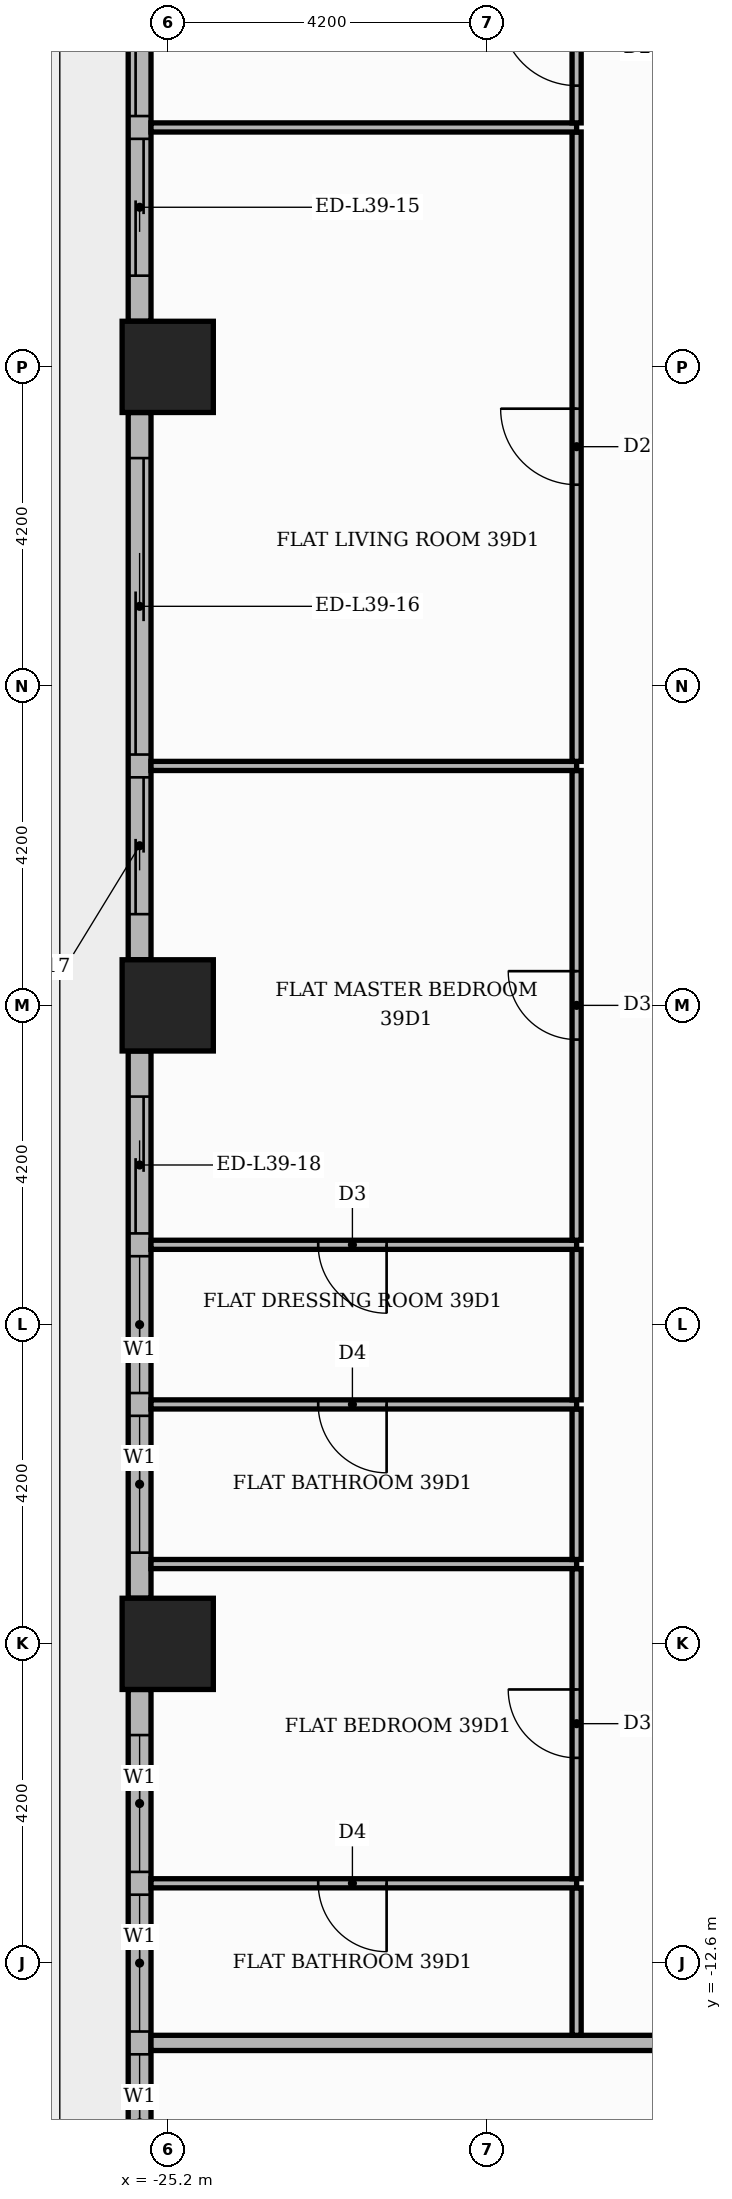
"""IFC4 building model, lengths in metres.
Left out: names, types, materials, properties, quantities, classifications, styles, units other than length and angle.
Written with IfcOpenShell. Run it as: python <this file> out.ifc"""

import sys

from ifc_helpers import new_model, si_unit, direction, frame, frame_2d, origin, origin_2d, place, context, subcontext, project, spatial, rectangle, extrude, element, fill, save


model = new_model("IFC4")
c1 = context("Model", 3, precision=1e-05, world=origin(), true_north=direction((0.0, 1.0)))
c2 = subcontext(c1, "Body", "Model", "MODEL_VIEW")
j1 = project(units=[si_unit("LENGTHUNIT", "METRE"), si_unit("PLANEANGLEUNIT", "RADIAN")], contexts=[c1])
p1 = place(None, origin())
s1 = spatial("IfcSite", under=j1, at=p1, CompositionType="ELEMENT")
p2 = place(p1, origin())
s2 = spatial("IfcBuilding", under=s1, at=p2, CompositionType="ELEMENT")
p3 = place(p2, frame((0.0, 0.0, 165.0)))
s3 = spatial("IfcBuildingStorey", under=s2, at=p3, CompositionType="ELEMENT", Elevation=165.0)
for number, where, z_axis, x_axis in (
    (1, (-25.2, 0.0, 0.0), (0.0, 0.0, 1.0), (1.0, 0.0, 0.0)),
    (2, (-25.2, -8.4, 0.0), (0.0, 0.0, 1.0), (1.0, 0.0, 0.0)),
    (3, (-25.2, 8.4, 0.0), (0.0, 0.0, 1.0), (1.0, 0.0, 0.0)),
):
    element("IfcColumn", number, at=place(p3, frame(where, z_axis=z_axis, x_axis=x_axis)), inside=s3, PredefinedType="COLUMN", context=c2, shape_type="SweptSolid", body=[
        extrude(rectangle(XDim=1.2, YDim=1.2, at=origin_2d()), origin(), (0.0, 0.0, 1.0), 3.9),
    ])
p4 = place(p3, frame((-25.57, 16.2, 0.0), z_axis=(0.0, 0.0, 1.0), x_axis=(0.0, -1.0, 0.0)))
e4 = element("IfcWall", 4, at=p4, inside=s3, PredefinedType="STANDARD", context=c2, shape_type="SweptSolid", body=[
    extrude(rectangle(XDim=7.2, YDim=0.3, at=frame_2d((3.6, 0.0))), origin(), (0.0, 0.0, 1.0), 3.48),
])
p5 = place(p4, frame((0.6, 0.0, 0.0)))
e5 = element("IfcOpeningElement", 5, at=p5, cuts=e4, PredefinedType="OPENING", context=c2, shape_type="SweptSolid", body=[
    extrude(rectangle(XDim=3.9, YDim=2.4, at=frame_2d((1.95, 1.2))), frame((0.0, 0.16, 0.0), z_axis=(0.0, -1.0, 0.0), x_axis=(1.0, 0.0, 0.0)), (0.0, 0.0, 1.0), 0.32),
])
p6 = place(p4, frame((4.8, 0.0, 0.0)))
e6 = element("IfcOpeningElement", 6, at=p6, cuts=e4, PredefinedType="OPENING", context=c2, shape_type="SweptSolid", body=[
    extrude(rectangle(XDim=1.8, YDim=2.4, at=frame_2d((0.9, 1.2))), frame((0.0, 0.16, 0.0), z_axis=(0.0, -1.0, 0.0), x_axis=(1.0, 0.0, 0.0)), (0.0, 0.0, 1.0), 0.32),
])
p7 = place(p3, frame((-25.57, 7.8, 0.0), z_axis=(0.0, 0.0, 1.0), x_axis=(0.0, -1.0, 0.0)))
e7 = element("IfcWall", 7, at=p7, inside=s3, PredefinedType="STANDARD", context=c2, shape_type="SweptSolid", body=[
    extrude(rectangle(XDim=7.2, YDim=0.3, at=frame_2d((3.6, 0.0))), origin(), (0.0, 0.0, 1.0), 3.48),
])
p8 = place(p7, frame((0.6, 0.0, 0.0)))
e8 = element("IfcOpeningElement", 8, at=p8, cuts=e7, PredefinedType="OPENING", context=c2, shape_type="SweptSolid", body=[
    extrude(rectangle(XDim=3.9, YDim=2.4, at=frame_2d((1.95, 1.2))), frame((0.0, 0.16, 0.0), z_axis=(0.0, -1.0, 0.0), x_axis=(1.0, 0.0, 0.0)), (0.0, 0.0, 1.0), 0.32),
])
p9 = place(p7, frame((4.8, 0.0, 0.0)))
e9 = element("IfcOpeningElement", 9, at=p9, cuts=e7, PredefinedType="OPENING", context=c2, shape_type="SweptSolid", body=[
    extrude(rectangle(XDim=1.8, YDim=2.4, at=frame_2d((0.9, 1.2))), frame((0.0, 0.16, 0.0), z_axis=(0.0, -1.0, 0.0), x_axis=(1.0, 0.0, 0.0)), (0.0, 0.0, 1.0), 0.32),
])
p10 = place(p3, frame((-25.57, -0.6, 0.0), z_axis=(0.0, 0.0, 1.0), x_axis=(0.0, -1.0, 0.0)))
e10 = element("IfcWall", 10, at=p10, inside=s3, PredefinedType="STANDARD", context=c2, shape_type="SweptSolid", body=[
    extrude(rectangle(XDim=7.2, YDim=0.3, at=frame_2d((3.6, 0.0))), origin(), (0.0, 0.0, 1.0), 3.48),
])
p11 = place(p10, frame((0.6, 0.0, 0.0)))
e11 = element("IfcOpeningElement", 11, at=p11, cuts=e10, PredefinedType="OPENING", context=c2, shape_type="SweptSolid", body=[
    extrude(rectangle(XDim=1.8, YDim=2.4, at=frame_2d((0.9, 1.2))), frame((0.0, 0.16, 0.0), z_axis=(0.0, -1.0, 0.0), x_axis=(1.0, 0.0, 0.0)), (0.0, 0.0, 1.0), 0.32),
])
p12 = place(p10, frame((2.7, 0.0, 0.9)))
e12 = element("IfcOpeningElement", 12, at=p12, cuts=e10, PredefinedType="OPENING", context=c2, shape_type="SweptSolid", body=[
    extrude(rectangle(XDim=1.8, YDim=2.1, at=frame_2d((0.9, 1.05))), frame((0.0, 0.16, 0.0), z_axis=(0.0, -1.0, 0.0), x_axis=(1.0, 0.0, 0.0)), (0.0, 0.0, 1.0), 0.32),
])
p13 = place(p10, frame((4.8, 0.0, 0.9)))
e13 = element("IfcOpeningElement", 13, at=p13, cuts=e10, PredefinedType="OPENING", context=c2, shape_type="SweptSolid", body=[
    extrude(rectangle(XDim=1.8, YDim=2.1, at=frame_2d((0.9, 1.05))), frame((0.0, 0.16, 0.0), z_axis=(0.0, -1.0, 0.0), x_axis=(1.0, 0.0, 0.0)), (0.0, 0.0, 1.0), 0.32),
])
p14 = place(p3, frame((-25.57, -9.0, 0.0), z_axis=(0.0, 0.0, 1.0), x_axis=(0.0, -1.0, 0.0)))
e14 = element("IfcWall", 14, at=p14, inside=s3, PredefinedType="STANDARD", context=c2, shape_type="SweptSolid", body=[
    extrude(rectangle(XDim=7.2, YDim=0.3, at=frame_2d((3.6, 0.0))), origin(), (0.0, 0.0, 1.0), 3.48),
])
p15 = place(p14, frame((0.6, 0.0, 0.9)))
e15 = element("IfcOpeningElement", 15, at=p15, cuts=e14, PredefinedType="OPENING", context=c2, shape_type="SweptSolid", body=[
    extrude(rectangle(XDim=1.8, YDim=2.1, at=frame_2d((0.9, 1.05))), frame((0.0, 0.16, 0.0), z_axis=(0.0, -1.0, 0.0), x_axis=(1.0, 0.0, 0.0)), (0.0, 0.0, 1.0), 0.32),
])
p16 = place(p14, frame((2.7, 0.0, 0.9)))
e16 = element("IfcOpeningElement", 16, at=p16, cuts=e14, PredefinedType="OPENING", context=c2, shape_type="SweptSolid", body=[
    extrude(rectangle(XDim=1.8, YDim=2.1, at=frame_2d((0.9, 1.05))), frame((0.0, 0.16, 0.0), z_axis=(0.0, -1.0, 0.0), x_axis=(1.0, 0.0, 0.0)), (0.0, 0.0, 1.0), 0.32),
])
p17 = place(p14, frame((4.8, 0.0, 0.9)))
e17 = element("IfcOpeningElement", 17, at=p17, cuts=e14, PredefinedType="OPENING", context=c2, shape_type="SweptSolid", body=[
    extrude(rectangle(XDim=1.8, YDim=2.1, at=frame_2d((0.9, 1.05))), frame((0.0, 0.16, 0.0), z_axis=(0.0, -1.0, 0.0), x_axis=(1.0, 0.0, 0.0)), (0.0, 0.0, 1.0), 0.32),
])
p18 = place(p3, frame((-25.42, -13.65, 0.0), z_axis=(0.0, 0.0, 1.0), x_axis=(1.0, 0.0, 0.0)))
e18 = element("IfcWall", 18, at=p18, inside=s3, PredefinedType="PARTITIONING", context=c2, shape_type="SweptSolid", body=[
    extrude(rectangle(XDim=39.07, YDim=0.2, at=frame_2d((19.535, 0.0))), origin(), (0.0, 0.0, 1.0), 3.48),
])
p19 = place(p18, frame((13.32, 0.0, 0.0)))
e19 = element("IfcOpeningElement", 19, at=p19, cuts=e18, PredefinedType="OPENING", context=c2, shape_type="SweptSolid", body=[
    extrude(rectangle(XDim=1.1, YDim=2.4, at=frame_2d((0.55, 1.2))), frame((0.0, 0.11, 0.0), z_axis=(0.0, -1.0, 0.0), x_axis=(1.0, 0.0, 0.0)), (0.0, 0.0, 1.0), 0.22),
])
p20 = place(p18, frame((21.72, 0.0, 0.0)))
e20 = element("IfcOpeningElement", 20, at=p20, cuts=e18, PredefinedType="OPENING", context=c2, shape_type="SweptSolid", body=[
    extrude(rectangle(XDim=1.1, YDim=2.4, at=frame_2d((0.55, 1.2))), frame((0.0, 0.11, 0.0), z_axis=(0.0, -1.0, 0.0), x_axis=(1.0, 0.0, 0.0)), (0.0, 0.0, 1.0), 0.22),
])
p21 = place(p3, frame((-19.82, -13.55, 0.0), z_axis=(0.0, 0.0, 1.0), x_axis=(0.0, 1.0, 0.0)))
e21 = element("IfcWall", 21, at=p21, inside=s3, PredefinedType="PARTITIONING", context=c2, shape_type="SweptSolid", body=[
    extrude(rectangle(XDim=1.94, YDim=0.12, at=frame_2d((0.97, 0.0))), origin(), (0.0, 0.0, 1.0), 3.48),
])
p22 = place(p3, frame((-25.42, -11.55, 0.0), z_axis=(0.0, 0.0, 1.0), x_axis=(1.0, 0.0, 0.0)))
e22 = element("IfcWall", 22, at=p22, inside=s3, PredefinedType="PARTITIONING", context=c2, shape_type="SweptSolid", body=[
    extrude(rectangle(XDim=5.6, YDim=0.12, at=frame_2d((2.8, 0.0))), origin(), (0.0, 0.0, 1.0), 3.48),
])
p23 = place(p22, frame((2.2, 0.0, 0.0)))
e23 = element("IfcOpeningElement", 23, at=p23, cuts=e22, PredefinedType="OPENING", context=c2, shape_type="SweptSolid", body=[
    extrude(rectangle(XDim=0.9, YDim=2.1, at=frame_2d((0.45, 1.05))), frame((0.0, 0.07, 0.0), z_axis=(0.0, -1.0, 0.0), x_axis=(1.0, 0.0, 0.0)), (0.0, 0.0, 1.0), 0.14),
])
p24 = place(p3, frame((-19.82, -11.49, 0.0), z_axis=(0.0, 0.0, 1.0), x_axis=(0.0, 1.0, 0.0)))
e24 = element("IfcWall", 24, at=p24, inside=s3, PredefinedType="PARTITIONING", context=c2, shape_type="SweptSolid", body=[
    extrude(rectangle(XDim=4.08, YDim=0.12, at=frame_2d((2.04, 0.0))), origin(), (0.0, 0.0, 1.0), 3.48),
])
p25 = place(p24, frame((1.59, 0.0, 0.0)))
e25 = element("IfcOpeningElement", 25, at=p25, cuts=e24, PredefinedType="OPENING", context=c2, shape_type="SweptSolid", body=[
    extrude(rectangle(XDim=0.9, YDim=2.1, at=frame_2d((0.45, 1.05))), frame((0.0, 0.07, 0.0), z_axis=(0.0, -1.0, 0.0), x_axis=(1.0, 0.0, 0.0)), (0.0, 0.0, 1.0), 0.14),
])
p26 = place(p3, frame((-25.42, -7.35, 0.0), z_axis=(0.0, 0.0, 1.0), x_axis=(1.0, 0.0, 0.0)))
e26 = element("IfcWall", 26, at=p26, inside=s3, PredefinedType="PARTITIONING", context=c2, shape_type="SweptSolid", body=[
    extrude(rectangle(XDim=5.6, YDim=0.12, at=frame_2d((2.8, 0.0))), origin(), (0.0, 0.0, 1.0), 3.48),
])
p27 = place(p3, frame((-19.82, -7.29, 0.0), z_axis=(0.0, 0.0, 1.0), x_axis=(0.0, 1.0, 0.0)))
e27 = element("IfcWall", 27, at=p27, inside=s3, PredefinedType="PARTITIONING", context=c2, shape_type="SweptSolid", body=[
    extrude(rectangle(XDim=1.98, YDim=0.12, at=frame_2d((0.99, 0.0))), origin(), (0.0, 0.0, 1.0), 3.48),
])
p28 = place(p3, frame((-25.42, -5.25, 0.0), z_axis=(0.0, 0.0, 1.0), x_axis=(1.0, 0.0, 0.0)))
e28 = element("IfcWall", 28, at=p28, inside=s3, PredefinedType="PARTITIONING", context=c2, shape_type="SweptSolid", body=[
    extrude(rectangle(XDim=5.6, YDim=0.12, at=frame_2d((2.8, 0.0))), origin(), (0.0, 0.0, 1.0), 3.48),
])
p29 = place(p28, frame((2.2, 0.0, 0.0)))
e29 = element("IfcOpeningElement", 29, at=p29, cuts=e28, PredefinedType="OPENING", context=c2, shape_type="SweptSolid", body=[
    extrude(rectangle(XDim=0.9, YDim=2.1, at=frame_2d((0.45, 1.05))), frame((0.0, 0.07, 0.0), z_axis=(0.0, -1.0, 0.0), x_axis=(1.0, 0.0, 0.0)), (0.0, 0.0, 1.0), 0.14),
])
p30 = place(p3, frame((-19.82, -5.19, 0.0), z_axis=(0.0, 0.0, 1.0), x_axis=(0.0, 1.0, 0.0)))
e30 = element("IfcWall", 30, at=p30, inside=s3, PredefinedType="PARTITIONING", context=c2, shape_type="SweptSolid", body=[
    extrude(rectangle(XDim=1.98, YDim=0.12, at=frame_2d((0.99, 0.0))), origin(), (0.0, 0.0, 1.0), 3.48),
])
p31 = place(p3, frame((-25.42, -3.15, 0.0), z_axis=(0.0, 0.0, 1.0), x_axis=(1.0, 0.0, 0.0)))
e31 = element("IfcWall", 31, at=p31, inside=s3, PredefinedType="PARTITIONING", context=c2, shape_type="SweptSolid", body=[
    extrude(rectangle(XDim=5.6, YDim=0.12, at=frame_2d((2.8, 0.0))), origin(), (0.0, 0.0, 1.0), 3.48),
])
p32 = place(p31, frame((2.2, 0.0, 0.0)))
e32 = element("IfcOpeningElement", 32, at=p32, cuts=e31, PredefinedType="OPENING", context=c2, shape_type="SweptSolid", body=[
    extrude(rectangle(XDim=0.9, YDim=2.1, at=frame_2d((0.45, 1.05))), frame((0.0, 0.07, 0.0), z_axis=(0.0, -1.0, 0.0), x_axis=(1.0, 0.0, 0.0)), (0.0, 0.0, 1.0), 0.14),
])
p33 = place(p3, frame((-19.82, -3.09, 0.0), z_axis=(0.0, 0.0, 1.0), x_axis=(0.0, 1.0, 0.0)))
e33 = element("IfcWall", 33, at=p33, inside=s3, PredefinedType="PARTITIONING", context=c2, shape_type="SweptSolid", body=[
    extrude(rectangle(XDim=6.18, YDim=0.12, at=frame_2d((3.09, 0.0))), origin(), (0.0, 0.0, 1.0), 3.48),
])
p34 = place(p33, frame((2.64, 0.0, 0.0)))
e34 = element("IfcOpeningElement", 34, at=p34, cuts=e33, PredefinedType="OPENING", context=c2, shape_type="SweptSolid", body=[
    extrude(rectangle(XDim=0.9, YDim=2.1, at=frame_2d((0.45, 1.05))), frame((0.0, 0.07, 0.0), z_axis=(0.0, -1.0, 0.0), x_axis=(1.0, 0.0, 0.0)), (0.0, 0.0, 1.0), 0.14),
])
p35 = place(p3, frame((-25.42, 3.15, 0.0), z_axis=(0.0, 0.0, 1.0), x_axis=(1.0, 0.0, 0.0)))
e35 = element("IfcWall", 35, at=p35, inside=s3, PredefinedType="PARTITIONING", context=c2, shape_type="SweptSolid", body=[
    extrude(rectangle(XDim=5.6, YDim=0.12, at=frame_2d((2.8, 0.0))), origin(), (0.0, 0.0, 1.0), 3.48),
])
p36 = place(p3, frame((-19.82, 3.21, 0.0), z_axis=(0.0, 0.0, 1.0), x_axis=(0.0, 1.0, 0.0)))
e36 = element("IfcWall", 36, at=p36, inside=s3, PredefinedType="PARTITIONING", context=c2, shape_type="SweptSolid", body=[
    extrude(rectangle(XDim=8.28, YDim=0.12, at=frame_2d((4.14, 0.0))), origin(), (0.0, 0.0, 1.0), 3.48),
])
p37 = place(p36, frame((3.64, 0.0, 0.0)))
e37 = element("IfcOpeningElement", 37, at=p37, cuts=e36, PredefinedType="OPENING", context=c2, shape_type="SweptSolid", body=[
    extrude(rectangle(XDim=1.0, YDim=2.1, at=frame_2d((0.5, 1.05))), frame((0.0, 0.07, 0.0), z_axis=(0.0, -1.0, 0.0), x_axis=(1.0, 0.0, 0.0)), (0.0, 0.0, 1.0), 0.14),
])
p38 = place(p3, frame((-25.42, 11.55, 0.0), z_axis=(0.0, 0.0, 1.0), x_axis=(1.0, 0.0, 0.0)))
e38 = element("IfcWall", 38, at=p38, inside=s3, PredefinedType="PARTITIONING", context=c2, shape_type="SweptSolid", body=[
    extrude(rectangle(XDim=5.6, YDim=0.12, at=frame_2d((2.8, 0.0))), origin(), (0.0, 0.0, 1.0), 3.48),
])
p39 = place(p3, frame((-19.82, 11.61, 0.0), z_axis=(0.0, 0.0, 1.0), x_axis=(0.0, 1.0, 0.0)))
e39 = element("IfcWall", 39, at=p39, inside=s3, PredefinedType="PARTITIONING", context=c2, shape_type="SweptSolid", body=[
    extrude(rectangle(XDim=1.98, YDim=0.12, at=frame_2d((0.99, 0.0))), origin(), (0.0, 0.0, 1.0), 3.48),
])
p40 = place(p39, frame((0.49, 0.0, 0.0)))
e40 = element("IfcOpeningElement", 40, at=p40, cuts=e39, PredefinedType="OPENING", context=c2, shape_type="SweptSolid", body=[
    extrude(rectangle(XDim=1.0, YDim=2.1, at=frame_2d((0.5, 1.05))), frame((0.0, 0.07, 0.0), z_axis=(0.0, -1.0, 0.0), x_axis=(1.0, 0.0, 0.0)), (0.0, 0.0, 1.0), 0.14),
])
p41 = place(p5, origin())
e41 = element("IfcDoor", 41, at=p41, inside=s3, OperationType="SLIDING_TO_LEFT", PredefinedType="DOOR", context=c2, shape_type="SweptSolid", body=[
    extrude(rectangle(XDim=3.9, YDim=2.4, at=frame_2d((1.95, 1.2))), frame((0.0, 0.025, 0.0), z_axis=(0.0, -1.0, 0.0), x_axis=(1.0, 0.0, 0.0)), (0.0, 0.0, 1.0), 0.05),
])
fill(e5, e41)
p42 = place(p6, origin())
e42 = element("IfcDoor", 42, at=p42, inside=s3, OperationType="SLIDING_TO_RIGHT", PredefinedType="DOOR", context=c2, shape_type="SweptSolid", body=[
    extrude(rectangle(XDim=1.8, YDim=2.4, at=frame_2d((0.9, 1.2))), frame((0.0, 0.025, 0.0), z_axis=(0.0, -1.0, 0.0), x_axis=(1.0, 0.0, 0.0)), (0.0, 0.0, 1.0), 0.05),
])
fill(e6, e42)
p43 = place(p8, origin())
e43 = element("IfcDoor", 43, at=p43, inside=s3, OperationType="SLIDING_TO_LEFT", PredefinedType="DOOR", context=c2, shape_type="SweptSolid", body=[
    extrude(rectangle(XDim=3.9, YDim=2.4, at=frame_2d((1.95, 1.2))), frame((0.0, 0.025, 0.0), z_axis=(0.0, -1.0, 0.0), x_axis=(1.0, 0.0, 0.0)), (0.0, 0.0, 1.0), 0.05),
])
fill(e8, e43)
p44 = place(p9, origin())
e44 = element("IfcDoor", 44, at=p44, inside=s3, OperationType="SLIDING_TO_RIGHT", PredefinedType="DOOR", context=c2, shape_type="SweptSolid", body=[
    extrude(rectangle(XDim=1.8, YDim=2.4, at=frame_2d((0.9, 1.2))), frame((0.0, 0.025, 0.0), z_axis=(0.0, -1.0, 0.0), x_axis=(1.0, 0.0, 0.0)), (0.0, 0.0, 1.0), 0.05),
])
fill(e9, e44)
p45 = place(p11, origin())
e45 = element("IfcDoor", 45, at=p45, inside=s3, OperationType="SLIDING_TO_LEFT", PredefinedType="DOOR", context=c2, shape_type="SweptSolid", body=[
    extrude(rectangle(XDim=1.8, YDim=2.4, at=frame_2d((0.9, 1.2))), frame((0.0, 0.025, 0.0), z_axis=(0.0, -1.0, 0.0), x_axis=(1.0, 0.0, 0.0)), (0.0, 0.0, 1.0), 0.05),
])
fill(e11, e45)
p46 = place(p12, origin())
e46 = element("IfcWindow", 46, at=p46, inside=s3, PartitioningType="SINGLE_PANEL", PredefinedType="WINDOW", context=c2, shape_type="SweptSolid", body=[
    extrude(rectangle(XDim=1.8, YDim=2.1, at=frame_2d((0.9, 1.05))), frame((0.0, 0.03, 0.0), z_axis=(0.0, -1.0, 0.0), x_axis=(1.0, 0.0, 0.0)), (0.0, 0.0, 1.0), 0.06),
])
fill(e12, e46)
p47 = place(p13, origin())
e47 = element("IfcWindow", 47, at=p47, inside=s3, PartitioningType="SINGLE_PANEL", PredefinedType="WINDOW", context=c2, shape_type="SweptSolid", body=[
    extrude(rectangle(XDim=1.8, YDim=2.1, at=frame_2d((0.9, 1.05))), frame((0.0, 0.03, 0.0), z_axis=(0.0, -1.0, 0.0), x_axis=(1.0, 0.0, 0.0)), (0.0, 0.0, 1.0), 0.06),
])
fill(e13, e47)
p48 = place(p15, origin())
e48 = element("IfcWindow", 48, at=p48, inside=s3, PartitioningType="SINGLE_PANEL", PredefinedType="WINDOW", context=c2, shape_type="SweptSolid", body=[
    extrude(rectangle(XDim=1.8, YDim=2.1, at=frame_2d((0.9, 1.05))), frame((0.0, 0.03, 0.0), z_axis=(0.0, -1.0, 0.0), x_axis=(1.0, 0.0, 0.0)), (0.0, 0.0, 1.0), 0.06),
])
fill(e15, e48)
p49 = place(p16, origin())
e49 = element("IfcWindow", 49, at=p49, inside=s3, PartitioningType="SINGLE_PANEL", PredefinedType="WINDOW", context=c2, shape_type="SweptSolid", body=[
    extrude(rectangle(XDim=1.8, YDim=2.1, at=frame_2d((0.9, 1.05))), frame((0.0, 0.03, 0.0), z_axis=(0.0, -1.0, 0.0), x_axis=(1.0, 0.0, 0.0)), (0.0, 0.0, 1.0), 0.06),
])
fill(e16, e49)
p50 = place(p17, origin())
e50 = element("IfcWindow", 50, at=p50, inside=s3, PartitioningType="SINGLE_PANEL", PredefinedType="WINDOW", context=c2, shape_type="SweptSolid", body=[
    extrude(rectangle(XDim=1.8, YDim=2.1, at=frame_2d((0.9, 1.05))), frame((0.0, 0.03, 0.0), z_axis=(0.0, -1.0, 0.0), x_axis=(1.0, 0.0, 0.0)), (0.0, 0.0, 1.0), 0.06),
])
fill(e17, e50)
p51 = place(p40, origin())
e51 = element("IfcDoor", 51, at=p51, inside=s3, OperationType="SINGLE_SWING_RIGHT", PredefinedType="DOOR", context=c2, shape_type="SweptSolid", body=[
    extrude(rectangle(XDim=1.0, YDim=2.1, at=frame_2d((0.5, 1.05))), frame((0.0, 0.025, 0.0), z_axis=(0.0, -1.0, 0.0), x_axis=(1.0, 0.0, 0.0)), (0.0, 0.0, 1.0), 0.05),
])
fill(e40, e51)
p52 = place(p37, origin())
e52 = element("IfcDoor", 52, at=p52, inside=s3, OperationType="SINGLE_SWING_RIGHT", PredefinedType="DOOR", context=c2, shape_type="SweptSolid", body=[
    extrude(rectangle(XDim=1.0, YDim=2.1, at=frame_2d((0.5, 1.05))), frame((0.0, 0.025, 0.0), z_axis=(0.0, -1.0, 0.0), x_axis=(1.0, 0.0, 0.0)), (0.0, 0.0, 1.0), 0.05),
])
fill(e37, e52)
p53 = place(p34, origin())
e53 = element("IfcDoor", 53, at=p53, inside=s3, OperationType="SINGLE_SWING_RIGHT", PredefinedType="DOOR", context=c2, shape_type="SweptSolid", body=[
    extrude(rectangle(XDim=0.9, YDim=2.1, at=frame_2d((0.45, 1.05))), frame((0.0, 0.025, 0.0), z_axis=(0.0, -1.0, 0.0), x_axis=(1.0, 0.0, 0.0)), (0.0, 0.0, 1.0), 0.05),
])
fill(e34, e53)
p54 = place(p32, frame((0.9, 0.0, 0.0), z_axis=(0.0, 0.0, 1.0), x_axis=(-1.0, 0.0, 0.0)))
e54 = element("IfcDoor", 54, at=p54, inside=s3, OperationType="SINGLE_SWING_RIGHT", PredefinedType="DOOR", context=c2, shape_type="SweptSolid", body=[
    extrude(rectangle(XDim=0.9, YDim=2.1, at=frame_2d((0.45, 1.05))), frame((0.0, 0.025, 0.0), z_axis=(0.0, -1.0, 0.0), x_axis=(1.0, 0.0, 0.0)), (0.0, 0.0, 1.0), 0.05),
])
fill(e32, e54)
p55 = place(p29, frame((0.9, 0.0, 0.0), z_axis=(0.0, 0.0, 1.0), x_axis=(-1.0, 0.0, 0.0)))
e55 = element("IfcDoor", 55, at=p55, inside=s3, OperationType="SINGLE_SWING_RIGHT", PredefinedType="DOOR", context=c2, shape_type="SweptSolid", body=[
    extrude(rectangle(XDim=0.9, YDim=2.1, at=frame_2d((0.45, 1.05))), frame((0.0, 0.025, 0.0), z_axis=(0.0, -1.0, 0.0), x_axis=(1.0, 0.0, 0.0)), (0.0, 0.0, 1.0), 0.05),
])
fill(e29, e55)
p56 = place(p25, origin())
e56 = element("IfcDoor", 56, at=p56, inside=s3, OperationType="SINGLE_SWING_RIGHT", PredefinedType="DOOR", context=c2, shape_type="SweptSolid", body=[
    extrude(rectangle(XDim=0.9, YDim=2.1, at=frame_2d((0.45, 1.05))), frame((0.0, 0.025, 0.0), z_axis=(0.0, -1.0, 0.0), x_axis=(1.0, 0.0, 0.0)), (0.0, 0.0, 1.0), 0.05),
])
fill(e25, e56)
p57 = place(p23, frame((0.9, 0.0, 0.0), z_axis=(0.0, 0.0, 1.0), x_axis=(-1.0, 0.0, 0.0)))
e57 = element("IfcDoor", 57, at=p57, inside=s3, OperationType="SINGLE_SWING_RIGHT", PredefinedType="DOOR", context=c2, shape_type="SweptSolid", body=[
    extrude(rectangle(XDim=0.9, YDim=2.1, at=frame_2d((0.45, 1.05))), frame((0.0, 0.025, 0.0), z_axis=(0.0, -1.0, 0.0), x_axis=(1.0, 0.0, 0.0)), (0.0, 0.0, 1.0), 0.05),
])
fill(e23, e57)
save(model, sys.argv[1])
